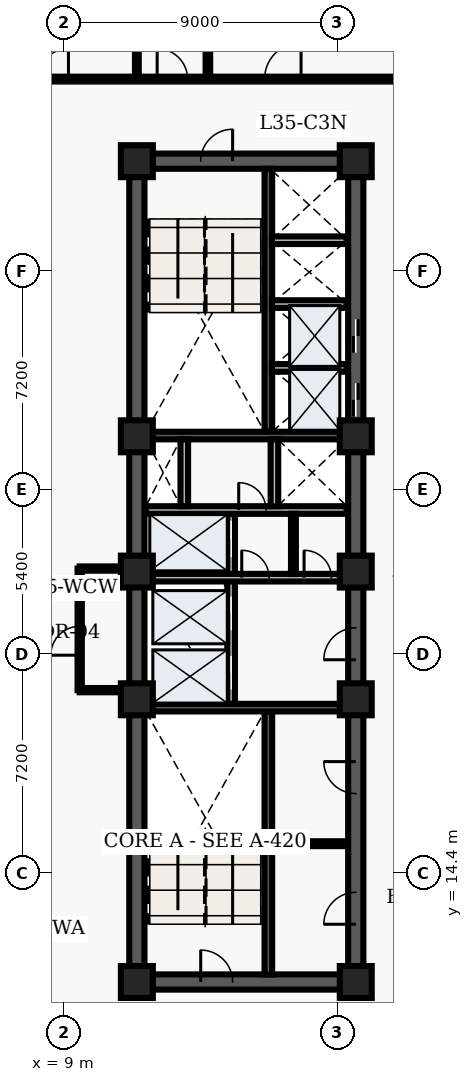
"""IFC4 building model, lengths in metres.
Left out: names, types, materials, properties, quantities, classifications, styles, units other than length and angle.
Written with IfcOpenShell. Run it as: python <this file> out.ifc"""

import sys

from ifc_helpers import new_model, entity, si_unit, converted_unit, direction, frame, origin_with_axes, origin_2d_with_axis, place, context, subcontext, project, spatial, polyline, rectangle, outline, extrude, element, fill, save


model = new_model("IFC4")
c1 = context("Model", 3, precision=1e-05, world=origin_with_axes(), true_north=direction((0.0, 1.0)))
c2 = subcontext(c1, "Body", "Model", "MODEL_VIEW")
j1 = project(units=[si_unit("LENGTHUNIT", "METRE"), converted_unit("PLANEANGLEUNIT", "DEGREE", entity("IfcPlaneAngleMeasure", 0.017), si_unit("PLANEANGLEUNIT", "RADIAN"), dimensions=[0, 0, 0, 0, 0, 0, 0])], contexts=[c1])
p1 = place(None, origin_with_axes())
s1 = spatial("IfcSite", under=j1, at=p1, CompositionType="ELEMENT")
p2 = place(p1, origin_with_axes())
s2 = spatial("IfcBuilding", under=s1, at=p2, CompositionType="ELEMENT")
p3 = place(p2, frame((0.0, 0.0, 144.6), z_axis=(0.0, 0.0, 1.0), x_axis=(1.0, 0.0, 0.0)))
s3 = spatial("IfcBuildingStorey", under=s2, at=p3, CompositionType="ELEMENT", Elevation=144.6)
p4 = place(p3, frame((11.4, 10.8, 0.0), z_axis=(0.0, 0.0, 1.0), x_axis=(0.0, 1.0, 0.0)))
e1 = element("IfcWall", 1, at=p4, inside=s3, PredefinedType="SHEAR", context=c2, shape_type="SweptSolid", body=[
    extrude(outline(polyline([(0.0, -0.25), (27.0, -0.25), (27.0, 0.25), (0.0, 0.25), (0.0, -0.25)])), origin_with_axes(), (0.0, 0.0, 1.0), 3.66),
])
p5 = place(p3, frame((11.4, 10.8, 0.0), z_axis=(0.0, 0.0, 1.0), x_axis=(1.0, 0.0, 0.0)))
e2 = element("IfcWall", 2, at=p5, inside=s3, PredefinedType="SHEAR", context=c2, shape_type="SweptSolid", body=[
    extrude(outline(polyline([(0.0, -0.25), (7.2, -0.25), (7.2, 0.25), (0.0, 0.25), (0.0, -0.25)])), origin_with_axes(), (0.0, 0.0, 1.0), 3.66),
])
p6 = place(p5, frame((2.625, 0.0, 0.0), z_axis=(0.0, 0.0, 1.0), x_axis=(1.0, 0.0, 0.0)))
e3 = element("IfcOpeningElement", 3, at=p6, cuts=e2, PredefinedType="OPENING", context=c2, shape_type="SweptSolid", body=[
    extrude(rectangle(XDim=1.05, YDim=0.52, at=origin_2d_with_axis()), origin_with_axes(), (0.0, 0.0, 1.0), 2.15),
])
p7 = place(p3, frame((11.4, 37.8, 0.0), z_axis=(0.0, 0.0, 1.0), x_axis=(1.0, 0.0, 0.0)))
e4 = element("IfcWall", 4, at=p7, inside=s3, PredefinedType="SHEAR", context=c2, shape_type="SweptSolid", body=[
    extrude(outline(polyline([(0.0, -0.25), (7.2, -0.25), (7.2, 0.25), (0.0, 0.25), (0.0, -0.25)])), origin_with_axes(), (0.0, 0.0, 1.0), 3.66),
])
p8 = place(p7, frame((2.625, 0.0, 0.0), z_axis=(0.0, 0.0, 1.0), x_axis=(1.0, 0.0, 0.0)))
e5 = element("IfcOpeningElement", 5, at=p8, cuts=e4, PredefinedType="OPENING", context=c2, shape_type="SweptSolid", body=[
    extrude(rectangle(XDim=1.05, YDim=0.52, at=origin_2d_with_axis()), origin_with_axes(), (0.0, 0.0, 1.0), 2.15),
])
p9 = place(p3, frame((18.6, 10.8, 0.0), z_axis=(0.0, 0.0, 1.0), x_axis=(0.0, 1.0, 0.0)))
e6 = element("IfcWall", 6, at=p9, inside=s3, PredefinedType="SHEAR", context=c2, shape_type="SweptSolid", body=[
    extrude(outline(polyline([(0.0, -0.25), (13.5, -0.25), (13.5, 0.25), (0.0, 0.25), (0.0, -0.25)])), origin_with_axes(), (0.0, 0.0, 1.0), 3.66),
])
p10 = place(p9, frame((11.125, 0.0, 0.0), z_axis=(0.0, 0.0, 1.0), x_axis=(1.0, 0.0, 0.0)))
e7 = element("IfcOpeningElement", 7, at=p10, cuts=e6, PredefinedType="OPENING", context=c2, shape_type="SweptSolid", body=[
    extrude(rectangle(XDim=1.05, YDim=0.52, at=origin_2d_with_axis()), origin_with_axes(), (0.0, 0.0, 1.0), 2.15),
])
p11 = place(p9, frame((2.425, 0.0, 0.0), z_axis=(0.0, 0.0, 1.0), x_axis=(1.0, 0.0, 0.0)))
e8 = element("IfcOpeningElement", 8, at=p11, cuts=e6, PredefinedType="OPENING", context=c2, shape_type="SweptSolid", body=[
    extrude(rectangle(XDim=1.05, YDim=0.52, at=origin_2d_with_axis()), origin_with_axes(), (0.0, 0.0, 1.0), 2.15),
])
p12 = place(p9, frame((6.725, 0.0, 0.0), z_axis=(0.0, 0.0, 1.0), x_axis=(1.0, 0.0, 0.0)))
e9 = element("IfcOpeningElement", 9, at=p12, cuts=e6, PredefinedType="OPENING", context=c2, shape_type="SweptSolid", body=[
    extrude(rectangle(XDim=1.05, YDim=0.52, at=origin_2d_with_axis()), origin_with_axes(), (0.0, 0.0, 1.0), 2.15),
])
p13 = place(p3, frame((18.6, 24.3, 0.0), z_axis=(0.0, 0.0, 1.0), x_axis=(0.0, 1.0, 0.0)))
e10 = element("IfcWall", 10, at=p13, inside=s3, PredefinedType="SHEAR", context=c2, shape_type="SweptSolid", body=[
    extrude(outline(polyline([(0.0, -0.25), (13.5, -0.25), (13.5, 0.25), (0.0, 0.25), (0.0, -0.25)])), origin_with_axes(), (0.0, 0.0, 1.0), 3.66),
])
p14 = place(p13, frame((5.65, 0.0, 0.0), z_axis=(0.0, 0.0, 1.0), x_axis=(1.0, 0.0, 0.0)))
e11 = element("IfcOpeningElement", 11, at=p14, cuts=e10, PredefinedType="OPENING", context=c2, shape_type="SweptSolid", body=[
    extrude(rectangle(XDim=1.1, YDim=0.52, at=origin_2d_with_axis()), origin_with_axes(), (0.0, 0.0, 1.0), 2.15),
])
p15 = place(p13, frame((7.75, 0.0, 0.0), z_axis=(0.0, 0.0, 1.0), x_axis=(1.0, 0.0, 0.0)))
e12 = element("IfcOpeningElement", 12, at=p15, cuts=e10, PredefinedType="OPENING", context=c2, shape_type="SweptSolid", body=[
    extrude(rectangle(XDim=1.1, YDim=0.52, at=origin_2d_with_axis()), origin_with_axes(), (0.0, 0.0, 1.0), 2.15),
])
p16 = place(p3, frame((15.725, 11.05, 0.0), z_axis=(0.0, 0.0, 1.0), x_axis=(0.0, 1.0, 0.0)))
e13 = element("IfcWall", 13, at=p16, inside=s3, PredefinedType="SHEAR", context=c2, shape_type="SweptSolid", body=[
    extrude(outline(polyline([(0.0, -0.125), (8.65, -0.125), (8.65, 0.125), (0.0, 0.125), (0.0, -0.125)])), origin_with_axes(), (0.0, 0.0, 1.0), 3.66),
])
p17 = place(p3, frame((11.65, 19.825, 0.0), z_axis=(0.0, 0.0, 1.0), x_axis=(1.0, 0.0, 0.0)))
e14 = element("IfcWall", 14, at=p17, inside=s3, PredefinedType="SHEAR", context=c2, shape_type="SweptSolid", body=[
    extrude(outline(polyline([(0.0, -0.125), (6.7, -0.125), (6.7, 0.125), (0.0, 0.125), (0.0, -0.125)])), origin_with_axes(), (0.0, 0.0, 1.0), 3.66),
])
p18 = place(p3, frame((15.725, 28.9, 0.0), z_axis=(0.0, 0.0, 1.0), x_axis=(0.0, 1.0, 0.0)))
e15 = element("IfcWall", 15, at=p18, inside=s3, PredefinedType="SHEAR", context=c2, shape_type="SweptSolid", body=[
    extrude(outline(polyline([(0.0, -0.125), (8.65, -0.125), (8.65, 0.125), (0.0, 0.125), (0.0, -0.125)])), origin_with_axes(), (0.0, 0.0, 1.0), 3.66),
])
p19 = place(p3, frame((11.65, 28.775, 0.0), z_axis=(0.0, 0.0, 1.0), x_axis=(1.0, 0.0, 0.0)))
e16 = element("IfcWall", 16, at=p19, inside=s3, PredefinedType="SHEAR", context=c2, shape_type="SweptSolid", body=[
    extrude(outline(polyline([(0.0, -0.125), (6.7, -0.125), (6.7, 0.125), (0.0, 0.125), (0.0, -0.125)])), origin_with_axes(), (0.0, 0.0, 1.0), 3.66),
])
p20 = place(p3, frame((14.5, 19.95, 0.0), z_axis=(0.0, 0.0, 1.0), x_axis=(0.0, 1.0, 0.0)))
e17 = element("IfcWall", 17, at=p20, inside=s3, PredefinedType="SOLIDWALL", context=c2, shape_type="SweptSolid", body=[
    extrude(outline(polyline([(0.0, -0.125), (6.25, -0.125), (6.25, 0.125), (0.0, 0.125), (0.0, -0.125)])), origin_with_axes(), (0.0, 0.0, 1.0), 2.7),
])
p21 = place(p20, frame((1.025, 0.0, 0.0), z_axis=(0.0, 0.0, 1.0), x_axis=(1.0, 0.0, 0.0)))
e18 = element("IfcOpeningElement", 18, at=p21, cuts=e17, PredefinedType="OPENING", context=c2, shape_type="SweptSolid", body=[
    extrude(rectangle(XDim=1.1, YDim=0.27, at=origin_2d_with_axis()), origin_with_axes(), (0.0, 0.0, 1.0), 2.15),
])
p22 = place(p20, frame((2.975, 0.0, 0.0), z_axis=(0.0, 0.0, 1.0), x_axis=(1.0, 0.0, 0.0)))
e19 = element("IfcOpeningElement", 19, at=p22, cuts=e17, PredefinedType="OPENING", context=c2, shape_type="SweptSolid", body=[
    extrude(rectangle(XDim=1.1, YDim=0.27, at=origin_2d_with_axis()), origin_with_axes(), (0.0, 0.0, 1.0), 2.15),
])
p23 = place(p20, frame((5.425, 0.0, 0.0), z_axis=(0.0, 0.0, 1.0), x_axis=(1.0, 0.0, 0.0)))
e20 = element("IfcOpeningElement", 20, at=p23, cuts=e17, PredefinedType="OPENING", context=c2, shape_type="SweptSolid", body=[
    extrude(rectangle(XDim=1.2, YDim=0.27, at=origin_2d_with_axis()), origin_with_axes(), (0.0, 0.0, 1.0), 2.15),
])
p24 = place(p3, frame((11.7, 24.1, 0.0), z_axis=(0.0, 0.0, 1.0), x_axis=(1.0, 0.0, 0.0)))
e21 = element("IfcWall", 21, at=p24, inside=s3, PredefinedType="SOLIDWALL", context=c2, shape_type="SweptSolid", body=[
    extrude(outline(polyline([(0.0, -0.125), (6.6, -0.125), (6.6, 0.125), (0.0, 0.125), (0.0, -0.125)])), origin_with_axes(), (0.0, 0.0, 1.0), 2.7),
])
p25 = place(p24, frame((3.6, 0.0, 0.0), z_axis=(0.0, 0.0, 1.0), x_axis=(1.0, 0.0, 0.0)))
e22 = element("IfcOpeningElement", 22, at=p25, cuts=e21, PredefinedType="OPENING", context=c2, shape_type="SweptSolid", body=[
    extrude(rectangle(XDim=0.9, YDim=0.27, at=origin_2d_with_axis()), origin_with_axes(), (0.0, 0.0, 1.0), 2.15),
])
p26 = place(p24, frame((5.65, 0.0, 0.0), z_axis=(0.0, 0.0, 1.0), x_axis=(1.0, 0.0, 0.0)))
e23 = element("IfcOpeningElement", 23, at=p26, cuts=e21, PredefinedType="OPENING", context=c2, shape_type="SweptSolid", body=[
    extrude(rectangle(XDim=0.9, YDim=0.27, at=origin_2d_with_axis()), origin_with_axes(), (0.0, 0.0, 1.0), 2.15),
])
p27 = place(p3, frame((11.7, 26.325, 0.0), z_axis=(0.0, 0.0, 1.0), x_axis=(1.0, 0.0, 0.0)))
e24 = element("IfcWall", 24, at=p27, inside=s3, PredefinedType="SOLIDWALL", context=c2, shape_type="SweptSolid", body=[
    extrude(outline(polyline([(0.0, -0.125), (6.6, -0.125), (6.6, 0.125), (0.0, 0.125), (0.0, -0.125)])), origin_with_axes(), (0.0, 0.0, 1.0), 2.7),
])
p28 = place(p27, frame((3.5, 0.0, 0.0), z_axis=(0.0, 0.0, 1.0), x_axis=(1.0, 0.0, 0.0)))
e25 = element("IfcOpeningElement", 25, at=p28, cuts=e24, PredefinedType="OPENING", context=c2, shape_type="SweptSolid", body=[
    extrude(rectangle(XDim=0.9, YDim=0.27, at=origin_2d_with_axis()), origin_with_axes(), (0.0, 0.0, 1.0), 2.15),
])
for number, where, z_axis, x_axis in (
    (26, (12.96, 26.45, 0.0), (0.0, 0.0, 1.0), (0.0, 1.0, 0.0)),
    (27, (15.925, 26.45, 0.0), (0.0, 0.0, 1.0), (0.0, 1.0, 0.0)),
):
    element("IfcWall", number, at=place(p3, frame(where, z_axis=z_axis, x_axis=x_axis)), inside=s3, PredefinedType="SOLIDWALL", context=c2, shape_type="SweptSolid", body=[
        extrude(outline(polyline([(0.0, -0.125), (2.2, -0.125), (2.2, 0.125), (0.0, 0.125), (0.0, -0.125)])), origin_with_axes(), (0.0, 0.0, 1.0), 2.7),
    ])
for number, where, z_axis, x_axis in (
    (28, (11.4, 10.8, 0.0), (0.0, 0.0, 1.0), (1.0, 0.0, 0.0)),
    (29, (11.4, 20.1, 0.0), (0.0, 0.0, 1.0), (1.0, 0.0, 0.0)),
    (30, (11.4, 24.3, 0.0), (0.0, 0.0, 1.0), (1.0, 0.0, 0.0)),
    (31, (11.4, 28.75, 0.0), (0.0, 0.0, 1.0), (1.0, 0.0, 0.0)),
    (32, (11.4, 37.8, 0.0), (0.0, 0.0, 1.0), (1.0, 0.0, 0.0)),
    (33, (18.6, 10.8, 0.0), (0.0, 0.0, 1.0), (1.0, 0.0, 0.0)),
    (34, (18.6, 20.1, 0.0), (0.0, 0.0, 1.0), (1.0, 0.0, 0.0)),
    (35, (18.6, 24.3, 0.0), (0.0, 0.0, 1.0), (1.0, 0.0, 0.0)),
    (36, (18.6, 28.75, 0.0), (0.0, 0.0, 1.0), (1.0, 0.0, 0.0)),
    (37, (18.6, 37.8, 0.0), (0.0, 0.0, 1.0), (1.0, 0.0, 0.0)),
):
    element("IfcColumn", number, at=place(p3, frame(where, z_axis=z_axis, x_axis=x_axis)), inside=s3, PredefinedType="COLUMN", context=c2, shape_type="SweptSolid", body=[
        extrude(rectangle(XDim=1.05, YDim=1.05, at=origin_2d_with_axis()), origin_with_axes(), (0.0, 0.0, 1.0), 3.9),
    ])
p29 = place(p3, frame((16.55, 24.22, 0.0), z_axis=(0.0, 0.0, 1.0), x_axis=(0.0, 1.0, 0.0)))
e38 = element("IfcWall", 38, at=p29, inside=s3, PredefinedType="PARTITIONING", context=c2, shape_type="SweptSolid", body=[
    extrude(outline(polyline([(0.0, -0.08), (1.98, -0.08), (1.98, 0.08), (0.0, 0.08), (0.0, -0.08)])), origin_with_axes(), (0.0, 0.0, 1.0), 2.7),
])
p30 = place(p3, frame((15.84, 15.35, 0.0), z_axis=(0.0, 0.0, 1.0), x_axis=(1.0, 0.0, 0.0)))
e39 = element("IfcWall", 39, at=p30, inside=s3, PredefinedType="PARTITIONING", context=c2, shape_type="SweptSolid", body=[
    extrude(outline(polyline([(0.0, -0.08), (2.46, -0.08), (2.46, 0.08), (0.0, 0.08), (0.0, -0.08)])), origin_with_axes(), (0.0, 0.0, 1.0), 2.7),
])
for number, where, z_axis, x_axis in (
    (40, (15.84, 31.0, 0.0), (0.0, 0.0, 1.0), (1.0, 0.0, 0.0)),
    (41, (15.84, 33.1, 0.0), (0.0, 0.0, 1.0), (1.0, 0.0, 0.0)),
    (42, (15.84, 35.2, 0.0), (0.0, 0.0, 1.0), (1.0, 0.0, 0.0)),
):
    element("IfcWall", number, at=place(p3, frame(where, z_axis=z_axis, x_axis=x_axis)), inside=s3, PredefinedType="SOLIDWALL", context=c2, shape_type="SweptSolid", body=[
        extrude(outline(polyline([(0.0, -0.125), (2.46, -0.125), (2.46, 0.125), (0.0, 0.125), (0.0, -0.125)])), origin_with_axes(), (0.0, 0.0, 1.0), 2.7),
    ])
p31 = place(p3, frame((9.52, 20.4, 0.0), z_axis=(0.0, 0.0, 1.0), x_axis=(0.0, 1.0, 0.0)))
e43 = element("IfcWall", 43, at=p31, inside=s3, PredefinedType="PARTITIONING", context=c2, shape_type="SweptSolid", body=[
    extrude(outline(polyline([(0.0, -0.07), (4.0, -0.07), (4.0, 0.07), (0.0, 0.07), (0.0, -0.07)])), origin_with_axes(), (0.0, 0.0, 1.0), 2.7),
])
p32 = place(p31, frame((1.625, 0.0, 0.0), z_axis=(0.0, 0.0, 1.0), x_axis=(1.0, 0.0, 0.0)))
e44 = element("IfcOpeningElement", 44, at=p32, cuts=e43, PredefinedType="OPENING", context=c2, shape_type="SweptSolid", body=[
    extrude(rectangle(XDim=0.95, YDim=0.16, at=origin_2d_with_axis()), origin_with_axes(), (0.0, 0.0, 1.0), 2.15),
])
for number, where, z_axis, x_axis in (
    (45, (9.52, 20.4, 0.0), (0.0, 0.0, 1.0), (1.0, 0.0, 0.0)),
    (46, (9.52, 24.4, 0.0), (0.0, 0.0, 1.0), (1.0, 0.0, 0.0)),
):
    element("IfcWall", number, at=place(p3, frame(where, z_axis=z_axis, x_axis=x_axis)), inside=s3, PredefinedType="PARTITIONING", context=c2, shape_type="SweptSolid", body=[
        extrude(outline(polyline([(0.0, -0.07), (1.58, -0.07), (1.58, 0.07), (0.0, 0.07), (0.0, -0.07)])), origin_with_axes(), (0.0, 0.0, 1.0), 2.7),
    ])
p33 = place(p3, frame((2.6, 40.5, 0.0), z_axis=(0.0, 0.0, 1.0), x_axis=(1.0, 0.0, 0.0)))
e47 = element("IfcWall", 47, at=p33, inside=s3, PredefinedType="PARTITIONING", context=c2, shape_type="SweptSolid", body=[
    extrude(outline(polyline([(0.0, -0.08), (19.26, -0.08), (19.26, 0.08), (0.0, 0.08), (0.0, -0.08)])), origin_with_axes(), (0.0, 0.0, 1.0), 2.7),
])
p34 = place(p33, frame((1.084, 0.0, 0.0), z_axis=(0.0, 0.0, 1.0), x_axis=(1.0, 0.0, 0.0)))
e48 = element("IfcOpeningElement", 48, at=p34, cuts=e47, PredefinedType="OPENING", context=c2, shape_type="SweptSolid", body=[
    extrude(rectangle(XDim=1.0, YDim=0.18, at=origin_2d_with_axis()), origin_with_axes(), (0.0, 0.0, 1.0), 2.15),
])
p35 = place(p33, frame((6.049, 0.0, 0.0), z_axis=(0.0, 0.0, 1.0), x_axis=(1.0, 0.0, 0.0)))
e49 = element("IfcOpeningElement", 49, at=p35, cuts=e47, PredefinedType="OPENING", context=c2, shape_type="SweptSolid", body=[
    extrude(rectangle(XDim=1.0, YDim=0.18, at=origin_2d_with_axis()), origin_with_axes(), (0.0, 0.0, 1.0), 2.15),
])
p36 = place(p33, frame((9.968, 0.0, 0.0), z_axis=(0.0, 0.0, 1.0), x_axis=(1.0, 0.0, 0.0)))
e50 = element("IfcOpeningElement", 50, at=p36, cuts=e47, PredefinedType="OPENING", context=c2, shape_type="SweptSolid", body=[
    extrude(rectangle(XDim=1.0, YDim=0.18, at=origin_2d_with_axis()), origin_with_axes(), (0.0, 0.0, 1.0), 2.15),
])
p37 = place(p33, frame((13.601, 0.0, 0.0), z_axis=(0.0, 0.0, 1.0), x_axis=(1.0, 0.0, 0.0)))
e51 = element("IfcOpeningElement", 51, at=p37, cuts=e47, PredefinedType="OPENING", context=c2, shape_type="SweptSolid", body=[
    extrude(rectangle(XDim=1.2, YDim=0.18, at=origin_2d_with_axis()), origin_with_axes(), (0.0, 0.0, 1.0), 2.2),
])
p38 = place(p3, frame((11.4, 40.6, 0.0), z_axis=(0.0, 0.0, 1.0), x_axis=(0.0, 1.0, 0.0)))
e52 = element("IfcWall", 52, at=p38, inside=s3, PredefinedType="PARTITIONING", context=c2, shape_type="SweptSolid", body=[
    extrude(outline(polyline([(0.0, -0.062), (7.665, -0.062), (7.665, 0.062), (0.0, 0.062), (0.0, -0.062)])), origin_with_axes(), (0.0, 0.0, 1.0), 2.7),
])
p39 = place(p3, frame((13.736, 40.6, 0.0), z_axis=(0.0, 0.0, 1.0), x_axis=(0.0, 1.0, 0.0)))
e53 = element("IfcWall", 53, at=p39, inside=s3, PredefinedType="PARTITIONING", context=c2, shape_type="SweptSolid", body=[
    extrude(outline(polyline([(0.0, -0.075), (7.665, -0.075), (7.665, 0.075), (0.0, 0.075), (0.0, -0.075)])), origin_with_axes(), (0.0, 0.0, 1.0), 2.7),
])
p40 = place(p13, frame((5.65, 0.0, 0.0), z_axis=(0.0, 0.0, 1.0), x_axis=(1.0, 0.0, 0.0)))
e54 = element("IfcDoor", 54, at=p40, inside=s3, OperationType="SLIDING_TO_LEFT", PredefinedType="DOOR", context=c2, shape_type="SweptSolid", body=[
    extrude(rectangle(XDim=1.1, YDim=0.09, at=origin_2d_with_axis()), origin_with_axes(), (0.0, 0.0, 1.0), 2.15),
])
fill(e11, e54)
p41 = place(p13, frame((7.75, 0.0, 0.0), z_axis=(0.0, 0.0, 1.0), x_axis=(1.0, 0.0, 0.0)))
e55 = element("IfcDoor", 55, at=p41, inside=s3, OperationType="SLIDING_TO_RIGHT", PredefinedType="DOOR", context=c2, shape_type="SweptSolid", body=[
    extrude(rectangle(XDim=1.1, YDim=0.09, at=origin_2d_with_axis()), origin_with_axes(), (0.0, 0.0, 1.0), 2.15),
])
fill(e12, e55)
p42 = place(p20, frame((1.025, 0.0, 0.0), z_axis=(0.0, 0.0, 1.0), x_axis=(1.0, 0.0, 0.0)))
e56 = element("IfcDoor", 56, at=p42, inside=s3, OperationType="SLIDING_TO_LEFT", PredefinedType="DOOR", context=c2, shape_type="SweptSolid", body=[
    extrude(rectangle(XDim=1.1, YDim=0.09, at=origin_2d_with_axis()), origin_with_axes(), (0.0, 0.0, 1.0), 2.15),
])
fill(e18, e56)
p43 = place(p20, frame((2.975, 0.0, 0.0), z_axis=(0.0, 0.0, 1.0), x_axis=(1.0, 0.0, 0.0)))
e57 = element("IfcDoor", 57, at=p43, inside=s3, OperationType="SLIDING_TO_RIGHT", PredefinedType="DOOR", context=c2, shape_type="SweptSolid", body=[
    extrude(rectangle(XDim=1.1, YDim=0.09, at=origin_2d_with_axis()), origin_with_axes(), (0.0, 0.0, 1.0), 2.15),
])
fill(e19, e57)
p44 = place(p20, frame((5.425, 0.0, 0.0), z_axis=(0.0, 0.0, 1.0), x_axis=(1.0, 0.0, 0.0)))
e58 = element("IfcDoor", 58, at=p44, inside=s3, OperationType="DOUBLE_DOOR_SLIDING", PredefinedType="DOOR", context=c2, shape_type="SweptSolid", body=[
    extrude(rectangle(XDim=1.2, YDim=0.09, at=origin_2d_with_axis()), origin_with_axes(), (0.0, 0.0, 1.0), 2.15),
])
fill(e20, e58)
p45 = place(p5, frame((2.625, 0.0, 0.0), z_axis=(0.0, 0.0, 1.0), x_axis=(1.0, 0.0, 0.0)))
e59 = element("IfcDoor", 59, at=p45, inside=s3, OperationType="SINGLE_SWING_LEFT", PredefinedType="DOOR", context=c2, shape_type="SweptSolid", body=[
    extrude(rectangle(XDim=1.05, YDim=0.09, at=origin_2d_with_axis()), origin_with_axes(), (0.0, 0.0, 1.0), 2.15),
])
fill(e3, e59)
p46 = place(p7, frame((2.625, 0.0, 0.0), z_axis=(0.0, 0.0, 1.0), x_axis=(1.0, 0.0, 0.0)))
e60 = element("IfcDoor", 60, at=p46, inside=s3, OperationType="SINGLE_SWING_RIGHT", PredefinedType="DOOR", context=c2, shape_type="SweptSolid", body=[
    extrude(rectangle(XDim=1.05, YDim=0.09, at=origin_2d_with_axis()), origin_with_axes(), (0.0, 0.0, 1.0), 2.15),
])
fill(e5, e60)
p47 = place(p9, frame((11.125, 0.0, 0.0), z_axis=(0.0, 0.0, 1.0), x_axis=(1.0, 0.0, 0.0)))
e61 = element("IfcDoor", 61, at=p47, inside=s3, OperationType="SINGLE_SWING_LEFT", PredefinedType="DOOR", context=c2, shape_type="SweptSolid", body=[
    extrude(rectangle(XDim=1.05, YDim=0.09, at=origin_2d_with_axis()), origin_with_axes(), (0.0, 0.0, 1.0), 2.15),
])
fill(e7, e61)
p48 = place(p24, frame((3.6, 0.0, 0.0), z_axis=(0.0, 0.0, 1.0), x_axis=(1.0, 0.0, 0.0)))
e62 = element("IfcDoor", 62, at=p48, inside=s3, OperationType="SINGLE_SWING_LEFT", PredefinedType="DOOR", context=c2, shape_type="SweptSolid", body=[
    extrude(rectangle(XDim=0.9, YDim=0.09, at=origin_2d_with_axis()), origin_with_axes(), (0.0, 0.0, 1.0), 2.15),
])
fill(e22, e62)
p49 = place(p24, frame((5.65, 0.0, 0.0), z_axis=(0.0, 0.0, 1.0), x_axis=(1.0, 0.0, 0.0)))
e63 = element("IfcDoor", 63, at=p49, inside=s3, OperationType="SINGLE_SWING_LEFT", PredefinedType="DOOR", context=c2, shape_type="SweptSolid", body=[
    extrude(rectangle(XDim=0.9, YDim=0.09, at=origin_2d_with_axis()), origin_with_axes(), (0.0, 0.0, 1.0), 2.15),
])
fill(e23, e63)
p50 = place(p27, frame((3.5, 0.0, 0.0), z_axis=(0.0, 0.0, 1.0), x_axis=(1.0, 0.0, 0.0)))
e64 = element("IfcDoor", 64, at=p50, inside=s3, OperationType="SINGLE_SWING_LEFT", PredefinedType="DOOR", context=c2, shape_type="SweptSolid", body=[
    extrude(rectangle(XDim=0.9, YDim=0.09, at=origin_2d_with_axis()), origin_with_axes(), (0.0, 0.0, 1.0), 2.15),
])
fill(e25, e64)
p51 = place(p9, frame((2.425, 0.0, 0.0), z_axis=(0.0, 0.0, 1.0), x_axis=(1.0, 0.0, 0.0)))
e65 = element("IfcDoor", 65, at=p51, inside=s3, OperationType="SINGLE_SWING_LEFT", PredefinedType="DOOR", context=c2, shape_type="SweptSolid", body=[
    extrude(rectangle(XDim=1.05, YDim=0.09, at=origin_2d_with_axis()), origin_with_axes(), (0.0, 0.0, 1.0), 2.15),
])
fill(e8, e65)
p52 = place(p9, frame((6.725, 0.0, 0.0), z_axis=(0.0, 0.0, 1.0), x_axis=(1.0, 0.0, 0.0)))
e66 = element("IfcDoor", 66, at=p52, inside=s3, OperationType="SINGLE_SWING_RIGHT", PredefinedType="DOOR", context=c2, shape_type="SweptSolid", body=[
    extrude(rectangle(XDim=1.05, YDim=0.09, at=origin_2d_with_axis()), origin_with_axes(), (0.0, 0.0, 1.0), 2.15),
])
fill(e9, e66)
p53 = place(p31, frame((1.625, 0.0, 0.0), z_axis=(0.0, 0.0, 1.0), x_axis=(1.0, 0.0, 0.0)))
e67 = element("IfcDoor", 67, at=p53, inside=s3, OperationType="SINGLE_SWING_LEFT", PredefinedType="DOOR", context=c2, shape_type="SweptSolid", body=[
    extrude(rectangle(XDim=0.95, YDim=0.084, at=origin_2d_with_axis()), origin_with_axes(), (0.0, 0.0, 1.0), 2.15),
])
fill(e44, e67)
p54 = place(p33, frame((6.049, 0.0, 0.0), z_axis=(0.0, 0.0, 1.0), x_axis=(1.0, 0.0, 0.0)))
e68 = element("IfcDoor", 68, at=p54, inside=s3, OperationType="SINGLE_SWING_RIGHT", PredefinedType="DOOR", context=c2, shape_type="SweptSolid", body=[
    extrude(rectangle(XDim=1.0, YDim=0.09, at=origin_2d_with_axis()), origin_with_axes(), (0.0, 0.0, 1.0), 2.15),
])
fill(e49, e68)
p55 = place(p33, frame((9.968, 0.0, 0.0), z_axis=(0.0, 0.0, 1.0), x_axis=(1.0, 0.0, 0.0)))
e69 = element("IfcDoor", 69, at=p55, inside=s3, OperationType="SINGLE_SWING_LEFT", PredefinedType="DOOR", context=c2, shape_type="SweptSolid", body=[
    extrude(rectangle(XDim=1.0, YDim=0.09, at=origin_2d_with_axis()), origin_with_axes(), (0.0, 0.0, 1.0), 2.15),
])
fill(e50, e69)
p56 = place(p33, frame((13.601, 0.0, 0.0), z_axis=(0.0, 0.0, 1.0), x_axis=(1.0, 0.0, 0.0)))
e70 = element("IfcDoor", 70, at=p56, inside=s3, OperationType="SINGLE_SWING_RIGHT", PredefinedType="DOOR", context=c2, shape_type="SweptSolid", body=[
    extrude(rectangle(XDim=1.2, YDim=0.09, at=origin_2d_with_axis()), origin_with_axes(), (0.0, 0.0, 1.0), 2.2),
])
fill(e51, e70)
save(model, sys.argv[1])
